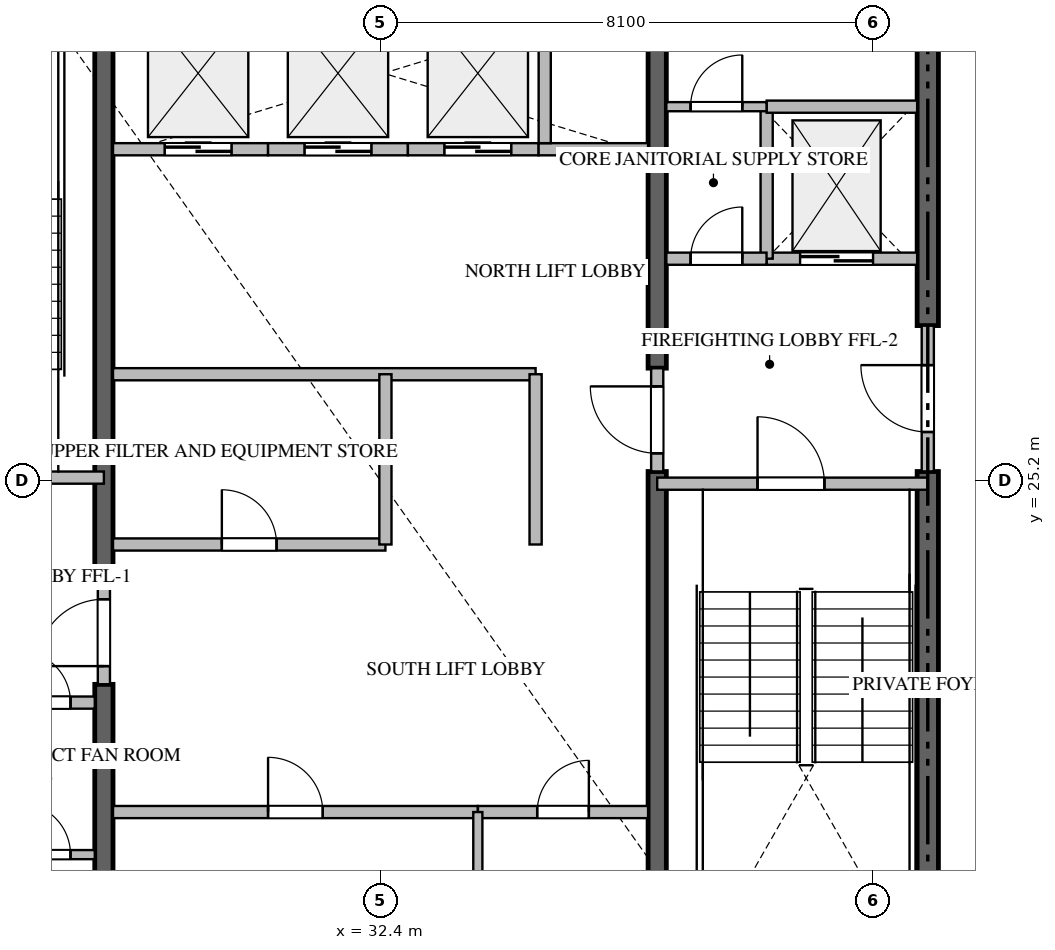
"""IFC4 building model, lengths in metres.
Left out: names, types, materials, properties, quantities, classifications, styles, units other than length and angle.
Written with IfcOpenShell. Run it as: python <this file> out.ifc"""

import sys

from ifc_helpers import new_model, si_unit, direction, frame, frame_2d, origin, place, context, subcontext, project, spatial, rectangle, extrude, source, transform, mapped, element, fill, save


model = new_model("IFC4")
c1 = context("Model", 3, precision=1e-05, world=origin(), true_north=direction((0.0, 1.0)))
c2 = subcontext(c1, "Body", "Model", "MODEL_VIEW")
j1 = project(units=[si_unit("LENGTHUNIT", "METRE"), si_unit("PLANEANGLEUNIT", "RADIAN")], contexts=[c1])
p1 = place(None, origin())
s1 = spatial("IfcSite", under=j1, at=p1, CompositionType="ELEMENT")
p2 = place(p1, origin())
s2 = spatial("IfcBuilding", under=s1, at=p2, CompositionType="ELEMENT")
p3 = place(p2, frame((0.0, 0.0, 233.55)))
s3 = spatial("IfcBuildingStorey", under=s2, at=p3, CompositionType="ELEMENT", Elevation=233.55)
p4 = place(p3, frame((41.4, 16.975, -0.26), z_axis=(0.0, 0.0, 1.0), x_axis=(0.0, 1.0, 0.0)))
e1 = element("IfcWall", 1, at=p4, inside=s3, PredefinedType="SHEAR", context=c2, shape_type="SweptSolid", body=[
    extrude(rectangle(XDim=8.375, YDim=0.35, at=frame_2d((4.188, 0.0))), origin(), (0.0, 0.0, 1.0), 3.848),
])
p5 = place(p3, frame((41.4, 27.75, -0.26), z_axis=(0.0, 0.0, 1.0), x_axis=(0.0, 1.0, 0.0)))
e2 = element("IfcWall", 2, at=p5, inside=s3, PredefinedType="SHEAR", context=c2, shape_type="SweptSolid", body=[
    extrude(rectangle(XDim=5.675, YDim=0.35, at=frame_2d((2.837, 0.0))), origin(), (0.0, 0.0, 1.0), 3.848),
])
p6 = place(p3, frame((27.85, 16.975, -0.26), z_axis=(0.0, 0.0, 1.0), x_axis=(0.0, 1.0, 0.0)))
e3 = element("IfcWall", 3, at=p6, inside=s3, PredefinedType="SHEAR", context=c2, shape_type="SweptSolid", body=[
    extrude(rectangle(XDim=4.875, YDim=0.3, at=frame_2d((2.438, 0.0))), origin(), (0.0, 0.0, 1.0), 3.848),
])
p7 = place(p3, frame((27.85, 23.55, -0.26), z_axis=(0.0, 0.0, 1.0), x_axis=(0.0, 1.0, 0.0)))
e4 = element("IfcWall", 4, at=p7, inside=s3, PredefinedType="SHEAR", context=c2, shape_type="SweptSolid", body=[
    extrude(rectangle(XDim=9.875, YDim=0.3, at=frame_2d((4.938, 0.0))), origin(), (0.0, 0.0, 1.0), 3.848),
])
p8 = place(p3, frame((36.95, 16.975, -0.26), z_axis=(0.0, 0.0, 1.0), x_axis=(0.0, 1.0, 0.0)))
e5 = element("IfcWall", 5, at=p8, inside=s3, PredefinedType="SHEAR", context=c2, shape_type="SweptSolid", body=[
    extrude(rectangle(XDim=8.375, YDim=0.3, at=frame_2d((4.188, 0.0))), origin(), (0.0, 0.0, 1.0), 3.848),
])
p9 = place(p3, frame((36.95, 27.05, -0.26), z_axis=(0.0, 0.0, 1.0), x_axis=(0.0, 1.0, 0.0)))
e6 = element("IfcWall", 6, at=p9, inside=s3, PredefinedType="SHEAR", context=c2, shape_type="SweptSolid", body=[
    extrude(rectangle(XDim=6.375, YDim=0.3, at=frame_2d((3.188, 0.0))), origin(), (0.0, 0.0, 1.0), 3.848),
])
p10 = place(p3, frame((23.4, 25.25, 0.0), z_axis=(0.0, 0.0, 1.0), x_axis=(1.0, 0.0, 0.0)))
e7 = element("IfcWall", 7, at=p10, inside=s3, PredefinedType="STANDARD", context=c2, shape_type="SweptSolid", body=[
    extrude(rectangle(XDim=4.45, YDim=0.2, at=frame_2d((2.225, 0.0))), origin(), (0.0, 0.0, 1.0), 3.59),
])
p11 = place(p10, frame((1.65, 0.0, 0.0)))
e8 = element("IfcOpeningElement", 8, at=p11, cuts=e7, PredefinedType="OPENING", context=c2, shape_type="SweptSolid", body=[
    extrude(rectangle(XDim=1.1, YDim=2.15, at=frame_2d((0.55, 1.075))), frame((0.0, 0.11, 0.0), z_axis=(0.0, -1.0, 0.0), x_axis=(1.0, 0.0, 0.0)), (0.0, 0.0, 1.0), 0.22),
])
p12 = place(p3, frame((36.95, 25.15, 0.0), z_axis=(0.0, 0.0, 1.0), x_axis=(1.0, 0.0, 0.0)))
e9 = element("IfcWall", 9, at=p12, inside=s3, PredefinedType="STANDARD", context=c2, shape_type="SweptSolid", body=[
    extrude(rectangle(XDim=4.45, YDim=0.2, at=frame_2d((2.225, 0.0))), origin(), (0.0, 0.0, 1.0), 3.59),
])
p13 = place(p12, frame((1.65, 0.0, 0.0)))
e10 = element("IfcOpeningElement", 10, at=p13, cuts=e9, PredefinedType="OPENING", context=c2, shape_type="SweptSolid", body=[
    extrude(rectangle(XDim=1.1, YDim=2.15, at=frame_2d((0.55, 1.075))), frame((0.0, 0.11, 0.0), z_axis=(0.0, -1.0, 0.0), x_axis=(1.0, 0.0, 0.0)), (0.0, 0.0, 1.0), 0.22),
])
p14 = place(p3, frame((38.75, 28.85, 0.0), z_axis=(0.0, 0.0, 1.0), x_axis=(1.0, 0.0, 0.0)))
e11 = element("IfcWall", 11, at=p14, inside=s3, PredefinedType="STANDARD", context=c2, shape_type="SweptSolid", body=[
    extrude(rectangle(XDim=2.475, YDim=0.2, at=frame_2d((1.238, 0.0))), origin(), (0.0, 0.0, 1.0), 3.59),
])
p15 = place(p14, frame((0.55, 0.0, 0.0)))
e12 = element("IfcOpeningElement", 12, at=p15, cuts=e11, PredefinedType="OPENING", context=c2, shape_type="SweptSolid", body=[
    extrude(rectangle(XDim=1.2, YDim=2.2, at=frame_2d((0.6, 1.1))), frame((0.0, 0.11, 0.0), z_axis=(0.0, -1.0, 0.0), x_axis=(1.0, 0.0, 0.0)), (0.0, 0.0, 1.0), 0.22),
])
p16 = place(p3, frame((28.0, 30.65, 0.0), z_axis=(0.0, 0.0, 1.0), x_axis=(1.0, 0.0, 0.0)))
e13 = element("IfcWall", 13, at=p16, inside=s3, PredefinedType="STANDARD", context=c2, shape_type="SweptSolid", body=[
    extrude(rectangle(XDim=2.55, YDim=0.2, at=frame_2d((1.275, 0.0))), origin(), (0.0, 0.0, 1.0), 3.59),
])
p17 = place(p16, frame((0.85, 0.0, 0.0)))
e14 = element("IfcOpeningElement", 14, at=p17, cuts=e13, PredefinedType="OPENING", context=c2, shape_type="SweptSolid", body=[
    extrude(rectangle(XDim=1.1, YDim=2.2, at=frame_2d((0.55, 1.1))), frame((0.0, 0.11, 0.0), z_axis=(0.0, -1.0, 0.0), x_axis=(1.0, 0.0, 0.0)), (0.0, 0.0, 1.0), 0.22),
])
p18 = place(p3, frame((30.55, 30.65, 0.0), z_axis=(0.0, 0.0, 1.0), x_axis=(1.0, 0.0, 0.0)))
e15 = element("IfcWall", 15, at=p18, inside=s3, PredefinedType="STANDARD", context=c2, shape_type="SweptSolid", body=[
    extrude(rectangle(XDim=2.3, YDim=0.2, at=frame_2d((1.15, 0.0))), origin(), (0.0, 0.0, 1.0), 3.59),
])
p19 = place(p18, frame((0.6, 0.0, 0.0)))
e16 = element("IfcOpeningElement", 16, at=p19, cuts=e15, PredefinedType="OPENING", context=c2, shape_type="SweptSolid", body=[
    extrude(rectangle(XDim=1.1, YDim=2.2, at=frame_2d((0.55, 1.1))), frame((0.0, 0.11, 0.0), z_axis=(0.0, -1.0, 0.0), x_axis=(1.0, 0.0, 0.0)), (0.0, 0.0, 1.0), 0.22),
])
p20 = place(p3, frame((32.85, 30.65, 0.0), z_axis=(0.0, 0.0, 1.0), x_axis=(1.0, 0.0, 0.0)))
e17 = element("IfcWall", 17, at=p20, inside=s3, PredefinedType="STANDARD", context=c2, shape_type="SweptSolid", body=[
    extrude(rectangle(XDim=2.15, YDim=0.2, at=frame_2d((1.075, 0.0))), origin(), (0.0, 0.0, 1.0), 3.59),
])
p21 = place(p20, frame((0.6, 0.0, 0.0)))
e18 = element("IfcOpeningElement", 18, at=p21, cuts=e17, PredefinedType="OPENING", context=c2, shape_type="SweptSolid", body=[
    extrude(rectangle(XDim=1.1, YDim=2.2, at=frame_2d((0.55, 1.1))), frame((0.0, 0.11, 0.0), z_axis=(0.0, -1.0, 0.0), x_axis=(1.0, 0.0, 0.0)), (0.0, 0.0, 1.0), 0.22),
])
p22 = place(p3, frame((35.0, 30.65, 0.0), z_axis=(0.0, 0.0, 1.0), x_axis=(1.0, 0.0, 0.0)))
e19 = element("IfcWall", 19, at=p22, inside=s3, PredefinedType="STANDARD", context=c2, shape_type="SweptSolid", body=[
    extrude(rectangle(XDim=1.8, YDim=0.2, at=frame_2d((0.9, 0.0))), origin(), (0.0, 0.0, 1.0), 3.59),
])
p23 = place(p3, frame((35.1, 30.75, 0.0), z_axis=(0.0, 0.0, 1.0), x_axis=(0.0, 1.0, 0.0)))
e20 = element("IfcWall", 20, at=p23, inside=s3, PredefinedType="STANDARD", context=c2, shape_type="SweptSolid", body=[
    extrude(rectangle(XDim=2.675, YDim=0.2, at=frame_2d((1.337, 0.0))), origin(), (0.0, 0.0, 1.0), 3.59),
])
p24 = place(p3, frame((26.052, 21.55, 0.0), z_axis=(0.0, 0.0, 1.0), x_axis=(1.0, 0.0, 0.0)))
e21 = element("IfcWall", 21, at=p24, inside=s3, PredefinedType="STANDARD", context=c2, shape_type="SweptSolid", body=[
    extrude(rectangle(XDim=1.648, YDim=0.2, at=frame_2d((0.824, 0.0))), origin(), (0.0, 0.0, 1.0), 3.59),
])
p25 = place(p24, frame((0.399, 0.0, 0.0)))
e22 = element("IfcOpeningElement", 22, at=p25, cuts=e21, PredefinedType="OPENING", context=c2, shape_type="SweptSolid", body=[
    extrude(rectangle(XDim=0.85, YDim=2.1, at=frame_2d((0.425, 1.05))), frame((0.0, 0.11, 0.0), z_axis=(0.0, -1.0, 0.0), x_axis=(1.0, 0.0, 0.0)), (0.0, 0.0, 1.0), 0.22),
])
p26 = place(p3, frame((38.75, 28.85, 0.0), z_axis=(0.0, 0.0, 1.0), x_axis=(0.0, 1.0, 0.0)))
e23 = element("IfcWall", 23, at=p26, inside=s3, PredefinedType="STANDARD", context=c2, shape_type="SweptSolid", body=[
    extrude(rectangle(XDim=2.5, YDim=0.2, at=frame_2d((1.25, 0.0))), origin(), (0.0, 0.0, 1.0), 3.59),
])
p27 = place(p3, frame((38.75, 31.35, 0.0), z_axis=(0.0, 0.0, 1.0), x_axis=(1.0, 0.0, 0.0)))
e24 = element("IfcWall", 24, at=p27, inside=s3, PredefinedType="STANDARD", context=c2, shape_type="SweptSolid", body=[
    extrude(rectangle(XDim=2.475, YDim=0.2, at=frame_2d((1.238, 0.0))), origin(), (0.0, 0.0, 1.0), 3.59),
])
p28 = place(p3, frame((37.1, 28.85, 0.0), z_axis=(0.0, 0.0, 1.0), x_axis=(1.0, 0.0, 0.0)))
e25 = element("IfcWall", 25, at=p28, inside=s3, PredefinedType="STANDARD", context=c2, shape_type="SweptSolid", body=[
    extrude(rectangle(XDim=1.648, YDim=0.2, at=frame_2d((0.824, 0.0))), origin(), (0.0, 0.0, 1.0), 3.59),
])
p29 = place(p28, frame((0.399, 0.0, 0.0)))
e26 = element("IfcOpeningElement", 26, at=p29, cuts=e25, PredefinedType="OPENING", context=c2, shape_type="SweptSolid", body=[
    extrude(rectangle(XDim=0.85, YDim=2.1, at=frame_2d((0.425, 1.05))), frame((0.0, 0.11, 0.0), z_axis=(0.0, -1.0, 0.0), x_axis=(1.0, 0.0, 0.0)), (0.0, 0.0, 1.0), 0.22),
])
p30 = place(p3, frame((41.4, 25.352, 0.0), z_axis=(0.0, 0.0, 1.0), x_axis=(0.0, 1.0, 0.0)))
e27 = element("IfcWall", 27, at=p30, inside=s3, PredefinedType="STANDARD", context=c2, shape_type="SweptSolid", body=[
    extrude(rectangle(XDim=2.396, YDim=0.2, at=frame_2d((1.198, 0.0))), origin(), (0.0, 0.0, 1.0), 3.59),
])
p31 = place(p30, frame((0.648, 0.0, 0.0)))
e28 = element("IfcOpeningElement", 28, at=p31, cuts=e27, PredefinedType="OPENING", context=c2, shape_type="SweptSolid", body=[
    extrude(rectangle(XDim=1.1, YDim=2.15, at=frame_2d((0.55, 1.075))), frame((0.0, 0.11, 0.0), z_axis=(0.0, -1.0, 0.0), x_axis=(1.0, 0.0, 0.0)), (0.0, 0.0, 1.0), 0.22),
])
p32 = place(p3, frame((27.85, 21.852, 0.0), z_axis=(0.0, 0.0, 1.0), x_axis=(0.0, 1.0, 0.0)))
e29 = element("IfcWall", 29, at=p32, inside=s3, PredefinedType="STANDARD", context=c2, shape_type="SweptSolid", body=[
    extrude(rectangle(XDim=1.696, YDim=0.2, at=frame_2d((0.848, 0.0))), origin(), (0.0, 0.0, 1.0), 3.59),
])
p33 = place(p32, frame((0.298, 0.0, 0.0)))
e30 = element("IfcOpeningElement", 30, at=p33, cuts=e29, PredefinedType="OPENING", context=c2, shape_type="SweptSolid", body=[
    extrude(rectangle(XDim=1.1, YDim=2.15, at=frame_2d((0.55, 1.075))), frame((0.0, 0.11, 0.0), z_axis=(0.0, -1.0, 0.0), x_axis=(1.0, 0.0, 0.0)), (0.0, 0.0, 1.0), 0.22),
])
p34 = place(p3, frame((36.95, 25.352, 0.0), z_axis=(0.0, 0.0, 1.0), x_axis=(0.0, 1.0, 0.0)))
e31 = element("IfcWall", 31, at=p34, inside=s3, PredefinedType="STANDARD", context=c2, shape_type="SweptSolid", body=[
    extrude(rectangle(XDim=1.696, YDim=0.2, at=frame_2d((0.848, 0.0))), origin(), (0.0, 0.0, 1.0), 3.59),
])
p35 = place(p34, frame((0.298, 0.0, 0.0)))
e32 = element("IfcOpeningElement", 32, at=p35, cuts=e31, PredefinedType="OPENING", context=c2, shape_type="SweptSolid", body=[
    extrude(rectangle(XDim=1.1, YDim=2.15, at=frame_2d((0.55, 1.075))), frame((0.0, 0.11, 0.0), z_axis=(0.0, -1.0, 0.0), x_axis=(1.0, 0.0, 0.0)), (0.0, 0.0, 1.0), 0.22),
])
p36 = place(p3, frame((26.052, 19.05, 0.0), z_axis=(0.0, 0.0, 1.0), x_axis=(1.0, 0.0, 0.0)))
e33 = element("IfcWall", 33, at=p36, inside=s3, PredefinedType="PARTITIONING", context=c2, shape_type="SweptSolid", body=[
    extrude(rectangle(XDim=1.648, YDim=0.15, at=frame_2d((0.824, 0.0))), origin(), (0.0, 0.0, 1.0), 3.59),
])
p37 = place(p36, frame((0.399, 0.0, 0.0)))
e34 = element("IfcOpeningElement", 34, at=p37, cuts=e33, PredefinedType="OPENING", context=c2, shape_type="SweptSolid", body=[
    extrude(rectangle(XDim=0.85, YDim=2.1, at=frame_2d((0.425, 1.05))), frame((0.0, 0.085, 0.0), z_axis=(0.0, -1.0, 0.0), x_axis=(1.0, 0.0, 0.0)), (0.0, 0.0, 1.0), 0.17),
])
p38 = place(p3, frame((37.1, 31.35, 0.0), z_axis=(0.0, 0.0, 1.0), x_axis=(1.0, 0.0, 0.0)))
e35 = element("IfcWall", 35, at=p38, inside=s3, PredefinedType="PARTITIONING", context=c2, shape_type="SweptSolid", body=[
    extrude(rectangle(XDim=1.648, YDim=0.15, at=frame_2d((0.824, 0.0))), origin(), (0.0, 0.0, 1.0), 3.59),
])
p39 = place(p38, frame((0.399, 0.0, 0.0)))
e36 = element("IfcOpeningElement", 36, at=p39, cuts=e35, PredefinedType="OPENING", context=c2, shape_type="SweptSolid", body=[
    extrude(rectangle(XDim=0.85, YDim=2.1, at=frame_2d((0.425, 1.05))), frame((0.0, 0.085, 0.0), z_axis=(0.0, -1.0, 0.0), x_axis=(1.0, 0.0, 0.0)), (0.0, 0.0, 1.0), 0.17),
])
p40 = place(p3, frame((28.0, 19.75, 0.0), z_axis=(0.0, 0.0, 1.0), x_axis=(1.0, 0.0, 0.0)))
e37 = element("IfcWall", 37, at=p40, inside=s3, PredefinedType="STANDARD", context=c2, shape_type="SweptSolid", body=[
    extrude(rectangle(XDim=6.0, YDim=0.2, at=frame_2d((3.0, 0.0))), origin(), (0.0, 0.0, 1.0), 3.59),
])
p41 = place(p40, frame((2.55, 0.0, 0.0)))
e38 = element("IfcOpeningElement", 38, at=p41, cuts=e37, PredefinedType="OPENING", context=c2, shape_type="SweptSolid", body=[
    extrude(rectangle(XDim=0.9, YDim=2.1, at=frame_2d((0.45, 1.05))), frame((0.0, 0.11, 0.0), z_axis=(0.0, -1.0, 0.0), x_axis=(1.0, 0.0, 0.0)), (0.0, 0.0, 1.0), 0.22),
])
p42 = place(p3, frame((34.002, 19.75, 0.0), z_axis=(0.0, 0.0, 1.0), x_axis=(1.0, 0.0, 0.0)))
e39 = element("IfcWall", 39, at=p42, inside=s3, PredefinedType="STANDARD", context=c2, shape_type="SweptSolid", body=[
    extrude(rectangle(XDim=2.798, YDim=0.2, at=frame_2d((1.399, 0.0))), origin(), (0.0, 0.0, 1.0), 3.59),
])
p43 = place(p42, frame((0.974, 0.0, 0.0)))
e40 = element("IfcOpeningElement", 40, at=p43, cuts=e39, PredefinedType="OPENING", context=c2, shape_type="SweptSolid", body=[
    extrude(rectangle(XDim=0.85, YDim=2.1, at=frame_2d((0.425, 1.05))), frame((0.0, 0.11, 0.0), z_axis=(0.0, -1.0, 0.0), x_axis=(1.0, 0.0, 0.0)), (0.0, 0.0, 1.0), 0.22),
])
p44 = place(p3, frame((34.0, 17.02, 0.0), z_axis=(0.0, 0.0, 1.0), x_axis=(0.0, 1.0, 0.0)))
e41 = element("IfcWall", 41, at=p44, inside=s3, PredefinedType="PARTITIONING", context=c2, shape_type="SweptSolid", body=[
    extrude(rectangle(XDim=2.73, YDim=0.15, at=frame_2d((1.365, 0.0))), origin(), (0.0, 0.0, 1.0), 3.59),
])
p45 = place(p3, frame((28.0, 26.95, 0.0), z_axis=(0.0, 0.0, 1.0), x_axis=(1.0, 0.0, 0.0)))
e42 = element("IfcWall", 42, at=p45, inside=s3, PredefinedType="STANDARD", context=c2, shape_type="SweptSolid", body=[
    extrude(rectangle(XDim=6.95, YDim=0.2, at=frame_2d((3.475, 0.0))), origin(), (0.0, 0.0, 1.0), 3.59),
])
p46 = place(p3, frame((34.95, 24.15, 0.0), z_axis=(0.0, 0.0, 1.0), x_axis=(0.0, 1.0, 0.0)))
e43 = element("IfcWall", 43, at=p46, inside=s3, PredefinedType="STANDARD", context=c2, shape_type="SweptSolid", body=[
    extrude(rectangle(XDim=2.8, YDim=0.2, at=frame_2d((1.4, 0.0))), origin(), (0.0, 0.0, 1.0), 3.59),
])
p47 = place(p3, frame((28.0, 24.15, 0.0), z_axis=(0.0, 0.0, 1.0), x_axis=(1.0, 0.0, 0.0)))
e44 = element("IfcWall", 44, at=p47, inside=s3, PredefinedType="STANDARD", context=c2, shape_type="SweptSolid", body=[
    extrude(rectangle(XDim=4.48, YDim=0.2, at=frame_2d((2.24, 0.0))), origin(), (0.0, 0.0, 1.0), 3.59),
])
p48 = place(p47, frame((1.79, 0.0, 0.0)))
e45 = element("IfcOpeningElement", 45, at=p48, cuts=e44, PredefinedType="OPENING", context=c2, shape_type="SweptSolid", body=[
    extrude(rectangle(XDim=0.9, YDim=2.1, at=frame_2d((0.45, 1.05))), frame((0.0, 0.11, 0.0), z_axis=(0.0, -1.0, 0.0), x_axis=(1.0, 0.0, 0.0)), (0.0, 0.0, 1.0), 0.22),
])
p49 = place(p3, frame((32.48, 24.15, 0.0), z_axis=(0.0, 0.0, 1.0), x_axis=(0.0, 1.0, 0.0)))
e46 = element("IfcWall", 46, at=p49, inside=s3, PredefinedType="STANDARD", context=c2, shape_type="SweptSolid", body=[
    extrude(rectangle(XDim=2.8, YDim=0.2, at=frame_2d((1.4, 0.0))), origin(), (0.0, 0.0, 1.0), 3.59),
])
m1 = source(origin(), c2, "Body", "SweptSolid", [
    extrude(rectangle(XDim=1.1, YDim=2.15, at=frame_2d((0.55, 1.075))), frame((0.0, 0.025, 0.0), z_axis=(0.0, -1.0, 0.0), x_axis=(1.0, 0.0, 0.0)), (0.0, 0.0, 1.0), 0.05),
])
p50 = place(p13, origin())
e47 = element("IfcDoor", 47, at=p50, inside=s3, OperationType="SINGLE_SWING_LEFT", PredefinedType="DOOR", context=c2, shape_type="MappedRepresentation", body=[
    mapped(m1, transform((0.0, 0.0, 0.0), scale=1.0)),
])
fill(e10, e47)
m2 = source(origin(), c2, "Body", "SweptSolid", [
    extrude(rectangle(XDim=1.2, YDim=2.2, at=frame_2d((0.6, 1.1))), frame((0.0, 0.025, 0.0), z_axis=(0.0, -1.0, 0.0), x_axis=(1.0, 0.0, 0.0)), (0.0, 0.0, 1.0), 0.05),
])
p51 = place(p15, origin())
e48 = element("IfcDoor", 48, at=p51, inside=s3, OperationType="DOUBLE_DOOR_SLIDING", PredefinedType="DOOR", context=c2, shape_type="MappedRepresentation", body=[
    mapped(m2, transform((0.0, 0.0, 0.0), scale=1.0)),
])
fill(e12, e48)
m3 = source(origin(), c2, "Body", "SweptSolid", [
    extrude(rectangle(XDim=1.1, YDim=2.2, at=frame_2d((0.55, 1.1))), frame((0.0, 0.025, 0.0), z_axis=(0.0, -1.0, 0.0), x_axis=(1.0, 0.0, 0.0)), (0.0, 0.0, 1.0), 0.05),
])
p52 = place(p17, origin())
e49 = element("IfcDoor", 49, at=p52, inside=s3, OperationType="DOUBLE_DOOR_SLIDING", PredefinedType="DOOR", context=c2, shape_type="MappedRepresentation", body=[
    mapped(m3, transform((0.0, 0.0, 0.0), scale=1.0)),
])
fill(e14, e49)
p53 = place(p19, origin())
e50 = element("IfcDoor", 50, at=p53, inside=s3, OperationType="DOUBLE_DOOR_SLIDING", PredefinedType="DOOR", context=c2, shape_type="MappedRepresentation", body=[
    mapped(m3, transform((0.0, 0.0, 0.0), scale=1.0)),
])
fill(e16, e50)
p54 = place(p21, origin())
e51 = element("IfcDoor", 51, at=p54, inside=s3, OperationType="DOUBLE_DOOR_SLIDING", PredefinedType="DOOR", context=c2, shape_type="MappedRepresentation", body=[
    mapped(m3, transform((0.0, 0.0, 0.0), scale=1.0)),
])
fill(e18, e51)
m4 = source(origin(), c2, "Body", "SweptSolid", [
    extrude(rectangle(XDim=0.85, YDim=2.1, at=frame_2d((0.425, 1.05))), frame((0.0, 0.025, 0.0), z_axis=(0.0, -1.0, 0.0), x_axis=(1.0, 0.0, 0.0)), (0.0, 0.0, 1.0), 0.05),
])
p55 = place(p25, origin())
e52 = element("IfcDoor", 52, at=p55, inside=s3, OperationType="SINGLE_SWING_LEFT", PredefinedType="DOOR", context=c2, shape_type="MappedRepresentation", body=[
    mapped(m4, transform((0.0, 0.0, 0.0), scale=1.0)),
])
fill(e22, e52)
p56 = place(p29, origin())
e53 = element("IfcDoor", 53, at=p56, inside=s3, OperationType="SINGLE_SWING_RIGHT", PredefinedType="DOOR", context=c2, shape_type="MappedRepresentation", body=[
    mapped(m4, transform((0.0, 0.0, 0.0), scale=1.0)),
])
fill(e26, e53)
p57 = place(p31, origin())
e54 = element("IfcDoor", 54, at=p57, inside=s3, OperationType="SINGLE_SWING_RIGHT", PredefinedType="DOOR", context=c2, shape_type="MappedRepresentation", body=[
    mapped(m1, transform((0.0, 0.0, 0.0), scale=1.0)),
])
fill(e28, e54)
p58 = place(p33, origin())
e55 = element("IfcDoor", 55, at=p58, inside=s3, OperationType="SINGLE_SWING_LEFT", PredefinedType="DOOR", context=c2, shape_type="MappedRepresentation", body=[
    mapped(m1, transform((0.0, 0.0, 0.0), scale=1.0)),
])
fill(e30, e55)
p59 = place(p35, origin())
e56 = element("IfcDoor", 56, at=p59, inside=s3, OperationType="SINGLE_SWING_RIGHT", PredefinedType="DOOR", context=c2, shape_type="MappedRepresentation", body=[
    mapped(m1, transform((0.0, 0.0, 0.0), scale=1.0)),
])
fill(e32, e56)
p60 = place(p37, origin())
e57 = element("IfcDoor", 57, at=p60, inside=s3, OperationType="SINGLE_SWING_LEFT", PredefinedType="DOOR", context=c2, shape_type="MappedRepresentation", body=[
    mapped(m4, transform((0.0, 0.0, 0.0), scale=1.0)),
])
fill(e34, e57)
p61 = place(p39, origin())
e58 = element("IfcDoor", 58, at=p61, inside=s3, OperationType="SINGLE_SWING_RIGHT", PredefinedType="DOOR", context=c2, shape_type="MappedRepresentation", body=[
    mapped(m4, transform((0.0, 0.0, 0.0), scale=1.0)),
])
fill(e36, e58)
m5 = source(origin(), c2, "Body", "SweptSolid", [
    extrude(rectangle(XDim=0.9, YDim=2.1, at=frame_2d((0.45, 1.05))), frame((0.0, 0.025, 0.0), z_axis=(0.0, -1.0, 0.0), x_axis=(1.0, 0.0, 0.0)), (0.0, 0.0, 1.0), 0.05),
])
p62 = place(p41, origin())
e59 = element("IfcDoor", 59, at=p62, inside=s3, OperationType="SINGLE_SWING_LEFT", PredefinedType="DOOR", context=c2, shape_type="MappedRepresentation", body=[
    mapped(m5, transform((0.0, 0.0, 0.0), scale=1.0)),
])
fill(e38, e59)
p63 = place(p43, origin())
e60 = element("IfcDoor", 60, at=p63, inside=s3, OperationType="SINGLE_SWING_RIGHT", PredefinedType="DOOR", context=c2, shape_type="MappedRepresentation", body=[
    mapped(m4, transform((0.0, 0.0, 0.0), scale=1.0)),
])
fill(e40, e60)
p64 = place(p48, origin())
e61 = element("IfcDoor", 61, at=p64, inside=s3, OperationType="SINGLE_SWING_LEFT", PredefinedType="DOOR", context=c2, shape_type="MappedRepresentation", body=[
    mapped(m5, transform((0.0, 0.0, 0.0), scale=1.0)),
])
fill(e45, e61)
save(model, sys.argv[1])
